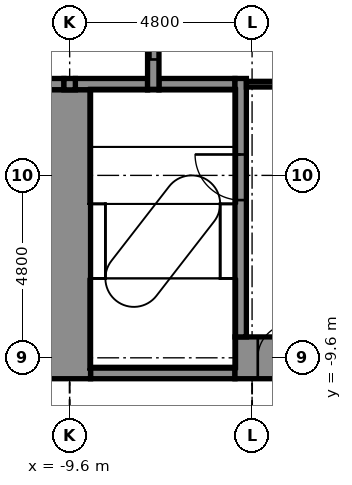
"""IFC4 building model, lengths in metres.
Left out: names, types, materials, properties, quantities, classifications, styles, units other than length and angle.
Written with IfcOpenShell. Run it as: python <this file> out.ifc"""

import sys

from ifc_helpers import new_model, si_unit, direction, frame, frame_2d, origin, place, context, subcontext, project, spatial, rectangle, extrude, element, fill, save


model = new_model("IFC4")
c1 = context("Model", 3, precision=1e-05, world=origin(), true_north=direction((0.0, 1.0)))
c2 = subcontext(c1, "Body", "Model", "MODEL_VIEW")
j1 = project(units=[si_unit("LENGTHUNIT", "METRE"), si_unit("PLANEANGLEUNIT", "RADIAN")], contexts=[c1])
p1 = place(None, origin())
s1 = spatial("IfcSite", under=j1, at=p1, CompositionType="ELEMENT")
p2 = place(p1, origin())
s2 = spatial("IfcBuilding", under=s1, at=p2, CompositionType="ELEMENT")
p3 = place(p2, frame((0.0, 0.0, 22.4)))
s3 = spatial("IfcBuildingStorey", under=s2, at=p3, CompositionType="ELEMENT", Elevation=22.4)
p4 = place(p3, frame((-9.05, -10.0, -0.25), z_axis=(0.0, 0.0, 1.0), x_axis=(1.0, 0.0, 0.0)))
e1 = element("IfcWall", 1, at=p4, inside=s3, PredefinedType="STANDARD", context=c2, shape_type="SweptSolid", body=[
    extrude(rectangle(XDim=3.8, YDim=0.3, at=frame_2d((1.9, 0.0))), origin(), (0.0, 0.0, 1.0), 5.5),
])
p5 = place(p3, frame((-5.25, -9.6, -0.25), z_axis=(0.0, 0.0, 1.0), x_axis=(1.0, 0.0, 0.0)))
e2 = element("IfcWall", 2, at=p5, inside=s3, PredefinedType="SHEAR", context=c2, shape_type="SweptSolid", body=[
    extrude(rectangle(XDim=10.2, YDim=1.1, at=frame_2d((5.1, 0.0))), origin(), (0.0, 0.0, 1.0), 5.5),
])
p6 = place(p5, frame((0.6, 0.0, 0.25)))
e3 = element("IfcOpeningElement", 3, at=p6, cuts=e2, PredefinedType="OPENING", context=c2, shape_type="SweptSolid", body=[
    extrude(rectangle(XDim=0.9, YDim=2.1, at=frame_2d((0.45, 1.05))), frame((0.0, 0.56, 0.0), z_axis=(0.0, -1.0, 0.0), x_axis=(1.0, 0.0, 0.0)), (0.0, 0.0, 1.0), 1.12),
])
p7 = place(p3, frame((-10.85, -2.4, -0.25), z_axis=(0.0, 0.0, 1.0), x_axis=(1.0, 0.0, 0.0)))
e4 = element("IfcWall", 4, at=p7, inside=s3, PredefinedType="STANDARD", context=c2, shape_type="SweptSolid", body=[
    extrude(rectangle(XDim=1.1, YDim=0.3, at=frame_2d((0.55, 0.0))), origin(), (0.0, 0.0, 1.0), 5.5),
])
p8 = place(p3, frame((-9.45, -2.4, -0.25), z_axis=(0.0, 0.0, 1.0), x_axis=(1.0, 0.0, 0.0)))
e5 = element("IfcWall", 5, at=p8, inside=s3, PredefinedType="STANDARD", context=c2, shape_type="SweptSolid", body=[
    extrude(rectangle(XDim=1.9, YDim=0.3, at=frame_2d((0.95, 0.0))), origin(), (0.0, 0.0, 1.0), 5.5),
])
p9 = place(p3, frame((-7.25, -2.4, -0.25), z_axis=(0.0, 0.0, 1.0), x_axis=(1.0, 0.0, 0.0)))
e6 = element("IfcWall", 6, at=p9, inside=s3, PredefinedType="STANDARD", context=c2, shape_type="SweptSolid", body=[
    extrude(rectangle(XDim=2.0, YDim=0.3, at=frame_2d((1.0, 0.0))), origin(), (0.0, 0.0, 1.0), 5.5),
])
p10 = place(p3, frame((-9.6, -10.15, -0.25), z_axis=(0.0, 0.0, 1.0), x_axis=(0.0, 1.0, 0.0)))
e7 = element("IfcWall", 7, at=p10, inside=s3, PredefinedType="SHEAR", context=c2, shape_type="SweptSolid", body=[
    extrude(rectangle(XDim=7.6, YDim=1.1, at=frame_2d((3.8, 0.0))), origin(), (0.0, 0.0, 1.0), 5.5),
])
p11 = place(p3, frame((-9.6, -2.55, -0.25), z_axis=(0.0, 0.0, 1.0), x_axis=(0.0, 1.0, 0.0)))
e8 = element("IfcWall", 8, at=p11, inside=s3, PredefinedType="STANDARD", context=c2, shape_type="SweptSolid", body=[
    extrude(rectangle(XDim=0.3, YDim=0.3, at=frame_2d((0.15, 0.0))), origin(), (0.0, 0.0, 1.0), 5.5),
])
p12 = place(p3, frame((-7.4, -2.55, -0.25), z_axis=(0.0, 0.0, 1.0), x_axis=(0.0, 1.0, 0.0)))
e9 = element("IfcWall", 9, at=p12, inside=s3, PredefinedType="STANDARD", context=c2, shape_type="SweptSolid", body=[
    extrude(rectangle(XDim=5.1, YDim=0.3, at=frame_2d((2.55, 0.0))), origin(), (0.0, 0.0, 1.0), 5.5),
])
p13 = place(p12, frame((0.8, 0.0, 0.25)))
e10 = element("IfcOpeningElement", 10, at=p13, cuts=e9, PredefinedType="OPENING", context=c2, shape_type="SweptSolid", body=[
    extrude(rectangle(XDim=1.1, YDim=2.1, at=frame_2d((0.55, 1.05))), frame((0.0, 0.16, 0.0), z_axis=(0.0, -1.0, 0.0), x_axis=(1.0, 0.0, 0.0)), (0.0, 0.0, 1.0), 0.32),
])
p14 = place(p12, frame((3.2, 0.0, 0.25)))
e11 = element("IfcOpeningElement", 11, at=p14, cuts=e9, PredefinedType="OPENING", context=c2, shape_type="SweptSolid", body=[
    extrude(rectangle(XDim=1.1, YDim=2.1, at=frame_2d((0.55, 1.05))), frame((0.0, 0.16, 0.0), z_axis=(0.0, -1.0, 0.0), x_axis=(1.0, 0.0, 0.0)), (0.0, 0.0, 1.0), 0.32),
])
p15 = place(p3, frame((-5.1, -9.05, -0.25), z_axis=(0.0, 0.0, 1.0), x_axis=(0.0, 1.0, 0.0)))
e12 = element("IfcWall", 12, at=p15, inside=s3, PredefinedType="STANDARD", context=c2, shape_type="SweptSolid", body=[
    extrude(rectangle(XDim=6.8, YDim=0.3, at=frame_2d((3.4, 0.0))), origin(), (0.0, 0.0, 1.0), 5.5),
])
p16 = place(p15, frame((3.6, 0.0, 0.25)))
e13 = element("IfcOpeningElement", 13, at=p16, cuts=e12, PredefinedType="OPENING", context=c2, shape_type="SweptSolid", body=[
    extrude(rectangle(XDim=1.2, YDim=2.1, at=frame_2d((0.6, 1.05))), frame((0.0, 0.16, 0.0), z_axis=(0.0, -1.0, 0.0), x_axis=(1.0, 0.0, 0.0)), (0.0, 0.0, 1.0), 0.32),
])
p17 = place(p3, frame((-4.95, -2.4, 0.0), z_axis=(0.0, 0.0, 1.0), x_axis=(1.0, 0.0, 0.0)))
e14 = element("IfcWall", 14, at=p17, inside=s3, PredefinedType="PARTITIONING", context=c2, shape_type="SweptSolid", body=[
    extrude(rectangle(XDim=1.2, YDim=0.15, at=frame_2d((0.6, 0.0))), origin(), (0.0, 0.0, 1.0), 5.25),
])
p18 = place(p13, origin())
e15 = element("IfcDoor", 15, at=p18, inside=s3, OperationType="DOUBLE_DOOR_SLIDING", PredefinedType="DOOR", context=c2, shape_type="SweptSolid", body=[
    extrude(rectangle(XDim=1.1, YDim=2.1, at=frame_2d((0.55, 1.05))), frame((0.0, 0.025, 0.0), z_axis=(0.0, -1.0, 0.0), x_axis=(1.0, 0.0, 0.0)), (0.0, 0.0, 1.0), 0.05),
])
fill(e10, e15)
p19 = place(p16, origin())
e16 = element("IfcDoor", 16, at=p19, inside=s3, OperationType="SINGLE_SWING_RIGHT", PredefinedType="DOOR", context=c2, shape_type="SweptSolid", body=[
    extrude(rectangle(XDim=1.2, YDim=2.1, at=frame_2d((0.6, 1.05))), frame((0.0, 0.025, 0.0), z_axis=(0.0, -1.0, 0.0), x_axis=(1.0, 0.0, 0.0)), (0.0, 0.0, 1.0), 0.05),
])
fill(e13, e16)
p20 = place(p6, origin())
e17 = element("IfcDoor", 17, at=p20, inside=s3, OperationType="SINGLE_SWING_RIGHT", PredefinedType="DOOR", context=c2, shape_type="SweptSolid", body=[
    extrude(rectangle(XDim=0.9, YDim=2.1, at=frame_2d((0.45, 1.05))), frame((0.0, 0.025, 0.0), z_axis=(0.0, -1.0, 0.0), x_axis=(1.0, 0.0, 0.0)), (0.0, 0.0, 1.0), 0.05),
])
fill(e3, e17)
save(model, sys.argv[1])
